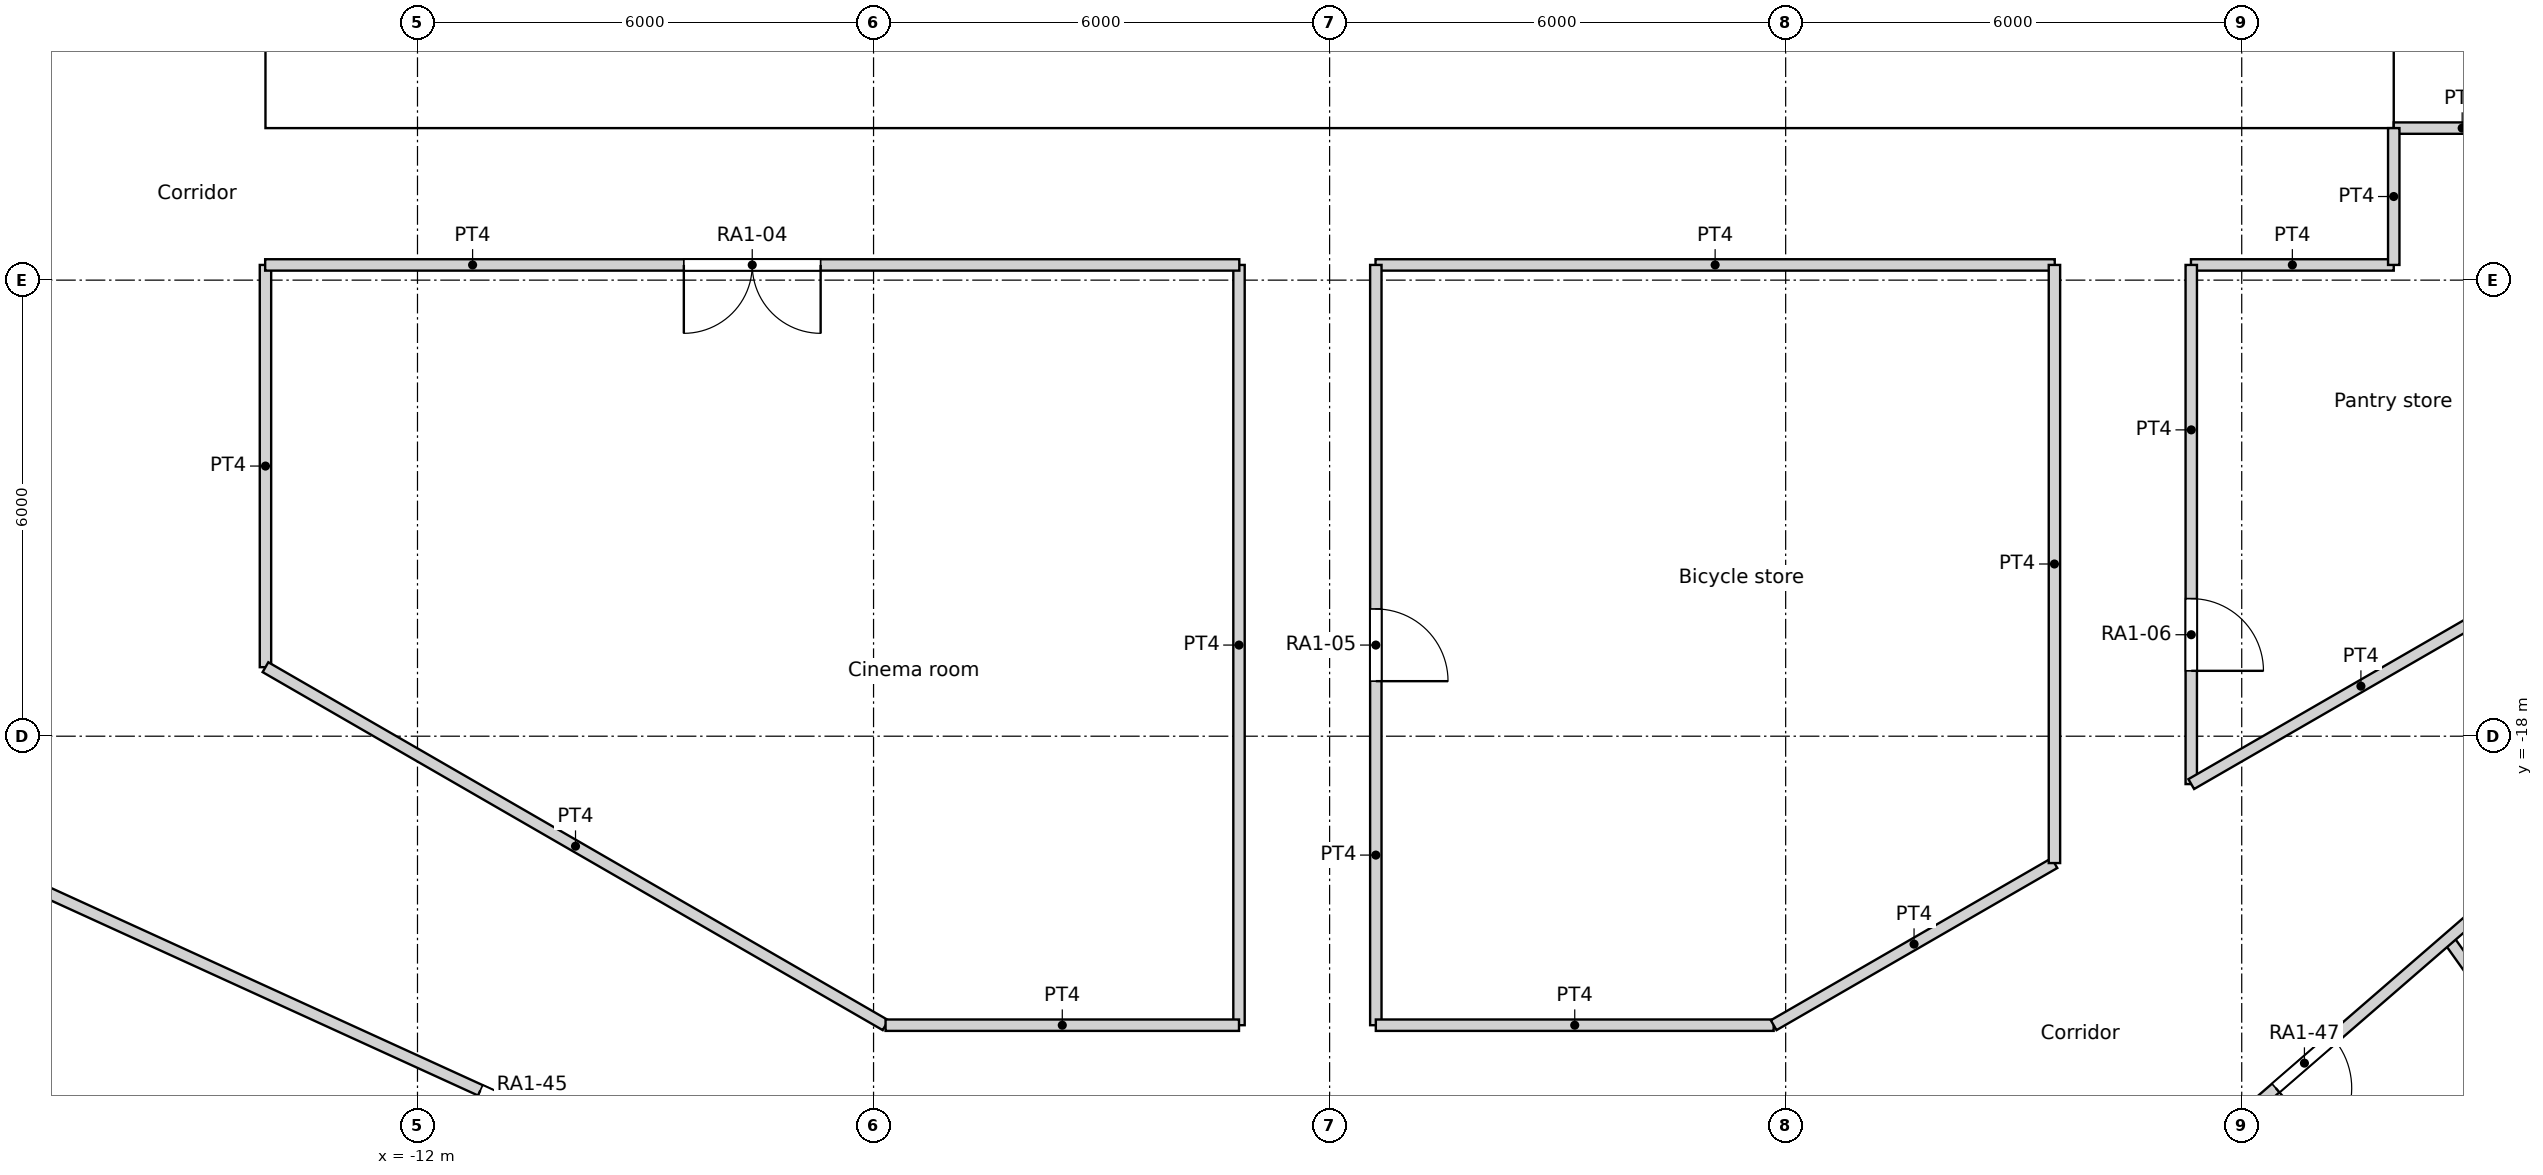
"""IFC4 building model, lengths in metres.
Left out: names, types, materials, properties, quantities, classifications, styles, units other than length and angle.
Written with IfcOpenShell. Run it as: python <this file> out.ifc"""

import sys

from ifc_helpers import new_model, si_unit, direction, frame, frame_2d, origin, origin_2d, place, context, subcontext, project, spatial, rectangle, circle, extrude, element, fill, save


model = new_model("IFC4")
c1 = context("Model", 3, precision=1e-05, world=origin(), true_north=direction((0.0, 1.0)))
c2 = subcontext(c1, "Body", "Model", "MODEL_VIEW")
j1 = project(units=[si_unit("LENGTHUNIT", "METRE"), si_unit("PLANEANGLEUNIT", "RADIAN")], contexts=[c1])
p1 = place(None, origin())
s1 = spatial("IfcSite", under=j1, at=p1, CompositionType="ELEMENT")
p2 = place(p1, origin())
s2 = spatial("IfcBuilding", under=s1, at=p2, CompositionType="ELEMENT")
p3 = place(p2, frame((0.0, 0.0, 28.2)))
s3 = spatial("IfcBuildingStorey", under=s2, at=p3, CompositionType="ELEMENT", Elevation=28.2)
for number, where, z_axis, x_axis in (
    (1, (-16.846, -17.855, 0.0), (0.0, 0.0, 1.0), (1.0, 0.0, 0.0)),
    (2, (-12.274, -21.259, 0.0), (0.0, 0.0, 1.0), (1.0, 0.0, 0.0)),
    (3, (9.723, -22.54, 0.0), (0.0, 0.0, 1.0), (1.0, 0.0, 0.0)),
    (4, (14.659, -19.69, 0.0), (0.0, 0.0, 1.0), (1.0, 0.0, 0.0)),
):
    element("IfcColumn", number, at=place(p3, frame(where, z_axis=z_axis, x_axis=x_axis)), inside=s3, PredefinedType="COLUMN", context=c2, shape_type="SweptSolid", body=[
        extrude(circle(Radius=0.75, at=origin_2d()), origin(), (0.0, 0.0, 1.0), 3.6),
    ])
for number, where, z_axis, x_axis in (
    (5, (-13.798, -12.802, 0.0), (0.0, 0.0, 1.0), (1.0, 0.0, 0.0)),
    (6, (-9.411, -16.301, 0.0), (0.0, 0.0, 1.0), (1.0, 0.0, 0.0)),
    (7, (-4.188, -18.35, 0.0), (0.0, 0.0, 1.0), (1.0, 0.0, 0.0)),
    (8, (1.406, -18.77, 0.0), (0.0, 0.0, 1.0), (1.0, 0.0, 0.0)),
    (9, (6.876, -17.521, 0.0), (0.0, 0.0, 1.0), (1.0, 0.0, 0.0)),
    (10, (11.735, -14.716, 0.0), (0.0, 0.0, 1.0), (1.0, 0.0, 0.0)),
    (11, (15.552, -10.603, 0.0), (0.0, 0.0, 1.0), (1.0, 0.0, 0.0)),
):
    element("IfcColumn", number, at=place(p3, frame(where, z_axis=z_axis, x_axis=x_axis)), inside=s3, PredefinedType="COLUMN", context=c2, shape_type="SweptSolid", body=[
        extrude(circle(Radius=0.8, at=origin_2d()), origin(), (0.0, 0.0, 1.0), 3.6),
    ])
p4 = place(p3, frame((-14.0, -9.4, 0.0), z_axis=(0.0, 0.0, 1.0), x_axis=(1.0, 0.0, 0.0)))
e12 = element("IfcWall", 12, at=p4, inside=s3, PredefinedType="SOLIDWALL", context=c2, shape_type="SweptSolid", body=[
    extrude(rectangle(XDim=28.0, YDim=1.2, at=frame_2d((14.0, 0.0))), origin(), (0.0, 0.0, 1.0), 3.6),
])
p5 = place(p4, frame((14.9, 0.0, 0.0)))
e13 = element("IfcOpeningElement", 13, at=p5, cuts=e12, PredefinedType="OPENING", context=c2, shape_type="SweptSolid", body=[
    extrude(rectangle(XDim=1.0, YDim=2.1, at=frame_2d((0.5, 1.05))), frame((0.0, 0.6, 0.0), z_axis=(0.0, -1.0, 0.0), x_axis=(1.0, 0.0, 0.0)), (0.0, 0.0, 1.0), 1.2),
])
p6 = place(p4, frame((9.8, 0.0, 0.0)))
e14 = element("IfcOpeningElement", 14, at=p6, cuts=e12, PredefinedType="OPENING", context=c2, shape_type="SweptSolid", body=[
    extrude(rectangle(XDim=1.8, YDim=2.1, at=frame_2d((0.9, 1.05))), frame((0.0, 0.6, 0.0), z_axis=(0.0, -1.0, 0.0), x_axis=(1.0, 0.0, 0.0)), (0.0, 0.0, 1.0), 1.2),
])
p7 = place(p4, frame((16.4, 0.0, 0.0)))
e15 = element("IfcOpeningElement", 15, at=p7, cuts=e12, PredefinedType="OPENING", context=c2, shape_type="SweptSolid", body=[
    extrude(rectangle(XDim=1.8, YDim=2.1, at=frame_2d((0.9, 1.05))), frame((0.0, 0.6, 0.0), z_axis=(0.0, -1.0, 0.0), x_axis=(1.0, 0.0, 0.0)), (0.0, 0.0, 1.0), 1.2),
])
p8 = place(p3, frame((-14.004, -11.8, 0.0), z_axis=(0.0, 0.0, 1.0), x_axis=(1.0, 0.0, 0.0)))
e16 = element("IfcWall", 16, at=p8, inside=s3, PredefinedType="PARTITIONING", context=c2, shape_type="SweptSolid", body=[
    extrude(rectangle(XDim=12.816, YDim=0.15, at=frame_2d((6.408, 0.0))), origin(), (0.0, 0.0, 1.0), 3.15),
])
p9 = place(p8, frame((5.508, 0.0, 0.0)))
e17 = element("IfcOpeningElement", 17, at=p9, cuts=e16, PredefinedType="OPENING", context=c2, shape_type="SweptSolid", body=[
    extrude(rectangle(XDim=1.8, YDim=2.1, at=frame_2d((0.9, 1.05))), frame((0.0, 0.075, 0.0), z_axis=(0.0, -1.0, 0.0), x_axis=(1.0, 0.0, 0.0)), (0.0, 0.0, 1.0), 0.15),
])
p10 = place(p3, frame((0.604, -11.8, 0.0), z_axis=(0.0, 0.0, 1.0), x_axis=(1.0, 0.0, 0.0)))
e18 = element("IfcWall", 18, at=p10, inside=s3, PredefinedType="PARTITIONING", context=c2, shape_type="SweptSolid", body=[
    extrude(rectangle(XDim=8.936, YDim=0.15, at=frame_2d((4.468, 0.0))), origin(), (0.0, 0.0, 1.0), 3.15),
])
p11 = place(p3, frame((14.0, -11.8, 0.0), z_axis=(0.0, 0.0, 1.0), x_axis=(0.0, 1.0, 0.0)))
e19 = element("IfcWall", 19, at=p11, inside=s3, PredefinedType="PARTITIONING", context=c2, shape_type="SweptSolid", body=[
    extrude(rectangle(XDim=1.8, YDim=0.15, at=frame_2d((0.9, 0.0))), origin(), (0.0, 0.0, 1.0), 3.15),
])
p12 = place(p3, frame((11.332, -11.8, 0.0), z_axis=(0.0, 0.0, 1.0), x_axis=(1.0, 0.0, 0.0)))
e20 = element("IfcWall", 20, at=p12, inside=s3, PredefinedType="PARTITIONING", context=c2, shape_type="SweptSolid", body=[
    extrude(rectangle(XDim=2.668, YDim=0.15, at=frame_2d((1.334, 0.0))), origin(), (0.0, 0.0, 1.0), 3.15),
])
p13 = place(p3, frame((14.0, -10.0, 0.0), z_axis=(0.0, 0.0, 1.0), x_axis=(1.0, 0.0, 0.0)))
e21 = element("IfcWall", 21, at=p13, inside=s3, PredefinedType="PARTITIONING", context=c2, shape_type="SweptSolid", body=[
    extrude(rectangle(XDim=1.8, YDim=0.15, at=frame_2d((0.9, 0.0))), origin(), (0.0, 0.0, 1.0), 3.15),
])
p14 = place(p3, frame((10.933, -23.94, 0.0), z_axis=(0.0, 0.0, 1.0), x_axis=(0.755770011705, 0.654837147242, 0.0)))
e22 = element("IfcWall", 22, at=p14, inside=s3, PredefinedType="PARTITIONING", context=c2, shape_type="SweptSolid", body=[
    extrude(rectangle(XDim=14.83, YDim=0.15, at=frame_2d((7.415, 0.0))), origin(), (0.0, 0.0, 1.0), 3.15),
])
p15 = place(p14, frame((2.003, 0.0, 0.0)))
e23 = element("IfcOpeningElement", 23, at=p15, cuts=e22, PredefinedType="OPENING", context=c2, shape_type="SweptSolid", body=[
    extrude(rectangle(XDim=1.0, YDim=2.04, at=frame_2d((0.5, 1.02))), frame((0.0, 0.075, 0.0), z_axis=(0.0, -1.0, 0.0), x_axis=(1.0, 0.0, 0.0)), (0.0, 0.0, 1.0), 0.15),
])
p16 = place(p3, frame((-14.0, -17.092, 0.0), z_axis=(0.0, 0.0, 1.0), x_axis=(0.0, 1.0, 0.0)))
e24 = element("IfcWall", 24, at=p16, inside=s3, PredefinedType="PARTITIONING", context=c2, shape_type="SweptSolid", body=[
    extrude(rectangle(XDim=5.292, YDim=0.15, at=frame_2d((2.646, 0.0))), origin(), (0.0, 0.0, 1.0), 3.15),
])
p17 = place(p3, frame((-14.0, -17.092, 0.0), z_axis=(0.0, 0.0, 1.0), x_axis=(0.86602719091, -0.499996904595, 0.0)))
e25 = element("IfcWall", 25, at=p17, inside=s3, PredefinedType="PARTITIONING", context=c2, shape_type="SweptSolid", body=[
    extrude(rectangle(XDim=9.42, YDim=0.15, at=frame_2d((4.71, 0.0))), origin(), (0.0, 0.0, 1.0), 3.15),
])
p18 = place(p3, frame((-5.842, -21.802, 0.0), z_axis=(0.0, 0.0, 1.0), x_axis=(1.0, 0.0, 0.0)))
e26 = element("IfcWall", 26, at=p18, inside=s3, PredefinedType="PARTITIONING", context=c2, shape_type="SweptSolid", body=[
    extrude(rectangle(XDim=4.65, YDim=0.15, at=frame_2d((2.325, 0.0))), origin(), (0.0, 0.0, 1.0), 3.15),
])
p19 = place(p3, frame((-1.192, -21.802, 0.0), z_axis=(0.0, 0.0, 1.0), x_axis=(0.0, 1.0, 0.0)))
e27 = element("IfcWall", 27, at=p19, inside=s3, PredefinedType="PARTITIONING", context=c2, shape_type="SweptSolid", body=[
    extrude(rectangle(XDim=10.002, YDim=0.15, at=frame_2d((5.001, 0.0))), origin(), (0.0, 0.0, 1.0), 3.15),
])
p20 = place(p3, frame((0.608, -21.802, 0.0), z_axis=(0.0, 0.0, 1.0), x_axis=(0.0, 1.0, 0.0)))
e28 = element("IfcWall", 28, at=p20, inside=s3, PredefinedType="PARTITIONING", context=c2, shape_type="SweptSolid", body=[
    extrude(rectangle(XDim=10.002, YDim=0.15, at=frame_2d((5.001, 0.0))), origin(), (0.0, 0.0, 1.0), 3.15),
])
p21 = place(p20, frame((4.526, 0.0, 0.0)))
e29 = element("IfcOpeningElement", 29, at=p21, cuts=e28, PredefinedType="OPENING", context=c2, shape_type="SweptSolid", body=[
    extrude(rectangle(XDim=0.95, YDim=2.1, at=frame_2d((0.475, 1.05))), frame((0.0, 0.075, 0.0), z_axis=(0.0, -1.0, 0.0), x_axis=(1.0, 0.0, 0.0)), (0.0, 0.0, 1.0), 0.15),
])
p22 = place(p3, frame((0.608, -21.802, 0.0), z_axis=(0.0, 0.0, 1.0), x_axis=(1.0, 0.0, 0.0)))
e30 = element("IfcWall", 30, at=p22, inside=s3, PredefinedType="PARTITIONING", context=c2, shape_type="SweptSolid", body=[
    extrude(rectangle(XDim=5.234, YDim=0.15, at=frame_2d((2.617, 0.0))), origin(), (0.0, 0.0, 1.0), 3.15),
])
p23 = place(p3, frame((5.842, -21.802, 0.0), z_axis=(0.0, 0.0, 1.0), x_axis=(0.865983505205, 0.500072563448, 0.0)))
e31 = element("IfcWall", 31, at=p23, inside=s3, PredefinedType="PARTITIONING", context=c2, shape_type="SweptSolid", body=[
    extrude(rectangle(XDim=4.265, YDim=0.15, at=frame_2d((2.133, 0.0))), origin(), (0.0, 0.0, 1.0), 3.15),
])
p24 = place(p3, frame((9.536, -19.669, 0.0), z_axis=(0.0, 0.0, 1.0), x_axis=(0.0, 1.0, 0.0)))
e32 = element("IfcWall", 32, at=p24, inside=s3, PredefinedType="PARTITIONING", context=c2, shape_type="SweptSolid", body=[
    extrude(rectangle(XDim=7.869, YDim=0.15, at=frame_2d((3.935, 0.0))), origin(), (0.0, 0.0, 1.0), 3.15),
])
p25 = place(p3, frame((11.336, -18.63, 0.0), z_axis=(0.0, 0.0, 1.0), x_axis=(0.0, 1.0, 0.0)))
e33 = element("IfcWall", 33, at=p25, inside=s3, PredefinedType="PARTITIONING", context=c2, shape_type="SweptSolid", body=[
    extrude(rectangle(XDim=6.83, YDim=0.15, at=frame_2d((3.415, 0.0))), origin(), (0.0, 0.0, 1.0), 3.15),
])
p26 = place(p25, frame((1.49, 0.0, 0.0)))
e34 = element("IfcOpeningElement", 34, at=p26, cuts=e33, PredefinedType="OPENING", context=c2, shape_type="SweptSolid", body=[
    extrude(rectangle(XDim=0.95, YDim=2.1, at=frame_2d((0.475, 1.05))), frame((0.0, 0.075, 0.0), z_axis=(0.0, -1.0, 0.0), x_axis=(1.0, 0.0, 0.0)), (0.0, 0.0, 1.0), 0.15),
])
p27 = place(p3, frame((11.336, -18.63, 0.0), z_axis=(0.0, 0.0, 1.0), x_axis=(0.866063337164, 0.499934291702, 0.0)))
e35 = element("IfcWall", 35, at=p27, inside=s3, PredefinedType="PARTITIONING", context=c2, shape_type="SweptSolid", body=[
    extrude(rectangle(XDim=5.155, YDim=0.15, at=frame_2d((2.577, 0.0))), origin(), (0.0, 0.0, 1.0), 3.15),
])
p28 = place(p3, frame((-17.235, -19.89, 0.0), z_axis=(0.0, 0.0, 1.0), x_axis=(0.90960889055, -0.415465601743, 0.0)))
e36 = element("IfcWall", 36, at=p28, inside=s3, PredefinedType="PARTITIONING", context=c2, shape_type="SweptSolid", body=[
    extrude(rectangle(XDim=14.829, YDim=0.15, at=frame_2d((7.415, 0.0))), origin(), (0.0, 0.0, 1.0), 3.15),
])
p29 = place(p28, frame((6.664, 0.0, 0.0)))
e37 = element("IfcOpeningElement", 37, at=p29, cuts=e36, PredefinedType="OPENING", context=c2, shape_type="SweptSolid", body=[
    extrude(rectangle(XDim=1.5, YDim=2.1, at=frame_2d((0.75, 1.05))), frame((0.0, 0.075, 0.0), z_axis=(0.0, -1.0, 0.0), x_axis=(1.0, 0.0, 0.0)), (0.0, 0.0, 1.0), 0.15),
])
p30 = place(p3, frame((14.715, -20.664, 0.0), z_axis=(0.0, 0.0, 1.0), x_axis=(0.580007254017, -0.814611309329, 0.0)))
e38 = element("IfcWall", 38, at=p30, inside=s3, PredefinedType="PARTITIONING", context=c2, shape_type="SweptSolid", body=[
    extrude(rectangle(XDim=5.857, YDim=0.15, at=frame_2d((2.928, 0.0))), origin(), (0.0, 0.0, 1.0), 3.15),
])
p31 = place(p5, origin())
e39 = element("IfcDoor", 39, at=p31, inside=s3, OperationType="SINGLE_SWING_LEFT", PredefinedType="DOOR", context=c2, shape_type="SweptSolid", body=[
    extrude(rectangle(XDim=1.0, YDim=2.1, at=frame_2d((0.5, 1.05))), frame((0.0, 0.025, 0.0), z_axis=(0.0, -1.0, 0.0), x_axis=(1.0, 0.0, 0.0)), (0.0, 0.0, 1.0), 0.05),
])
fill(e13, e39)
p32 = place(p6, origin())
e40 = element("IfcDoor", 40, at=p32, inside=s3, OperationType="DOUBLE_DOOR_SINGLE_SWING", PredefinedType="DOOR", context=c2, shape_type="SweptSolid", body=[
    extrude(rectangle(XDim=1.8, YDim=2.1, at=frame_2d((0.9, 1.05))), frame((0.0, 0.025, 0.0), z_axis=(0.0, -1.0, 0.0), x_axis=(1.0, 0.0, 0.0)), (0.0, 0.0, 1.0), 0.05),
])
fill(e14, e40)
p33 = place(p7, origin())
e41 = element("IfcDoor", 41, at=p33, inside=s3, OperationType="DOUBLE_DOOR_SINGLE_SWING", PredefinedType="DOOR", context=c2, shape_type="SweptSolid", body=[
    extrude(rectangle(XDim=1.8, YDim=2.1, at=frame_2d((0.9, 1.05))), frame((0.0, 0.025, 0.0), z_axis=(0.0, -1.0, 0.0), x_axis=(1.0, 0.0, 0.0)), (0.0, 0.0, 1.0), 0.05),
])
fill(e15, e41)
p34 = place(p9, origin())
e42 = element("IfcDoor", 42, at=p34, inside=s3, OperationType="DOUBLE_DOOR_SINGLE_SWING", PredefinedType="DOOR", context=c2, shape_type="SweptSolid", body=[
    extrude(rectangle(XDim=1.8, YDim=2.1, at=frame_2d((0.9, 1.05))), frame((0.0, 0.025, 0.0), z_axis=(0.0, -1.0, 0.0), x_axis=(1.0, 0.0, 0.0)), (0.0, 0.0, 1.0), 0.05),
])
fill(e17, e42)
p35 = place(p21, origin())
e43 = element("IfcDoor", 43, at=p35, inside=s3, OperationType="SINGLE_SWING_RIGHT", PredefinedType="DOOR", context=c2, shape_type="SweptSolid", body=[
    extrude(rectangle(XDim=0.95, YDim=2.1, at=frame_2d((0.475, 1.05))), frame((0.0, 0.025, 0.0), z_axis=(0.0, -1.0, 0.0), x_axis=(1.0, 0.0, 0.0)), (0.0, 0.0, 1.0), 0.05),
])
fill(e29, e43)
p36 = place(p26, origin())
e44 = element("IfcDoor", 44, at=p36, inside=s3, OperationType="SINGLE_SWING_RIGHT", PredefinedType="DOOR", context=c2, shape_type="SweptSolid", body=[
    extrude(rectangle(XDim=0.95, YDim=2.1, at=frame_2d((0.475, 1.05))), frame((0.0, 0.025, 0.0), z_axis=(0.0, -1.0, 0.0), x_axis=(1.0, 0.0, 0.0)), (0.0, 0.0, 1.0), 0.05),
])
fill(e34, e44)
p37 = place(p29, origin())
e45 = element("IfcDoor", 45, at=p37, inside=s3, OperationType="DOUBLE_DOOR_SINGLE_SWING", PredefinedType="DOOR", context=c2, shape_type="SweptSolid", body=[
    extrude(rectangle(XDim=1.5, YDim=2.1, at=frame_2d((0.75, 1.05))), frame((0.0, 0.025, 0.0), z_axis=(0.0, -1.0, 0.0), x_axis=(1.0, 0.0, 0.0)), (0.0, 0.0, 1.0), 0.05),
])
fill(e37, e45)
p38 = place(p15, origin())
e46 = element("IfcDoor", 46, at=p38, inside=s3, OperationType="SINGLE_SWING_RIGHT", PredefinedType="DOOR", context=c2, shape_type="SweptSolid", body=[
    extrude(rectangle(XDim=1.0, YDim=2.04, at=frame_2d((0.5, 1.02))), frame((0.0, 0.025, 0.0), z_axis=(0.0, -1.0, 0.0), x_axis=(1.0, 0.0, 0.0)), (0.0, 0.0, 1.0), 0.05),
])
fill(e23, e46)
save(model, sys.argv[1])
